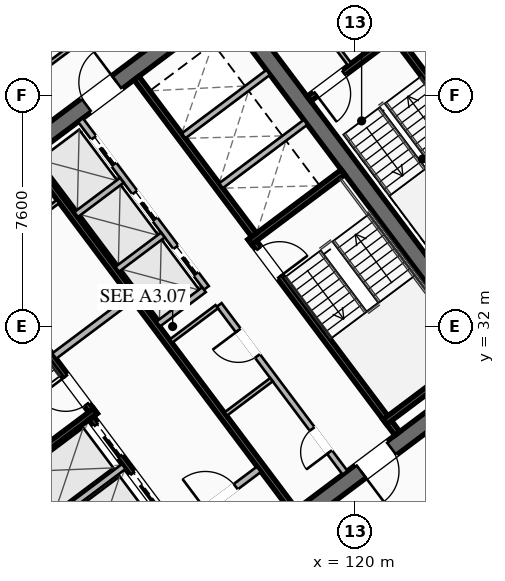
"""IFC4 building model, lengths in metres.
Left out: names, types, materials, properties, quantities, classifications, styles, units other than length and angle.
Written with IfcOpenShell. Run it as: python <this file> out.ifc"""

import sys

from ifc_helpers import new_model, si_unit, direction, frame, frame_2d, origin, place, context, subcontext, project, spatial, rectangle, extrude, element, fill, save


model = new_model("IFC4")
c1 = context("Model", 3, precision=1e-05, world=origin(), true_north=direction((0.0, 1.0)))
c2 = subcontext(c1, "Body", "Model", "MODEL_VIEW")
j1 = project(units=[si_unit("LENGTHUNIT", "METRE"), si_unit("PLANEANGLEUNIT", "RADIAN")], contexts=[c1])
p1 = place(None, origin())
s1 = spatial("IfcSite", under=j1, at=p1, CompositionType="ELEMENT")
p2 = place(p1, origin())
s2 = spatial("IfcBuilding", under=s1, at=p2, CompositionType="ELEMENT")
p3 = place(p2, frame((0.0, 0.0, 121.5)))
s3 = spatial("IfcBuildingStorey", under=s2, at=p3, CompositionType="ELEMENT", Elevation=121.5)
for number, where, z_axis, x_axis in (
    (1, (112.436, 21.077, 0.0), (0.0, 0.0, 1.0), (-0.6, 0.8, 0.0)),
    (2, (115.564, 42.923, 0.0), (0.0, 0.0, 1.0), (0.6, -0.8, 0.0)),
):
    element("IfcWall", number, at=place(p3, frame(where, z_axis=z_axis, x_axis=x_axis)), inside=s3, PredefinedType="SHEAR", context=c2, shape_type="SweptSolid", body=[
        extrude(rectangle(XDim=15.6, YDim=0.55, at=frame_2d((7.8, 0.0))), origin(), (0.0, 0.0, 1.0), 3.55),
    ])
p4 = place(p3, frame((124.539, 30.498, 0.0), z_axis=(0.0, 0.0, 1.0), x_axis=(-0.799998054672, -0.600002593761, 0.0)))
e3 = element("IfcWall", 3, at=p4, inside=s3, PredefinedType="SHEAR", context=c2, shape_type="SweptSolid", body=[
    extrude(rectangle(XDim=15.06, YDim=0.55, at=frame_2d((7.53, 0.0))), origin(), (0.0, 0.0, 1.0), 3.55),
])
p5 = place(p4, frame((9.23, 0.0, 0.0)))
e4 = element("IfcOpeningElement", 4, at=p5, cuts=e3, PredefinedType="OPENING", context=c2, shape_type="SweptSolid", body=[
    extrude(rectangle(XDim=1.25, YDim=2.25, at=frame_2d((0.625, 1.125))), frame((0.0, 0.285, 0.0), z_axis=(0.0, -1.0, 0.0), x_axis=(1.0, 0.0, 0.0)), (0.0, 0.0, 1.0), 0.57),
])
p6 = place(p4, frame((4.18, 0.0, 0.0)))
e5 = element("IfcOpeningElement", 5, at=p6, cuts=e3, PredefinedType="OPENING", context=c2, shape_type="SweptSolid", body=[
    extrude(rectangle(XDim=1.25, YDim=2.25, at=frame_2d((0.625, 1.125))), frame((0.0, 0.285, 0.0), z_axis=(0.0, -1.0, 0.0), x_axis=(1.0, 0.0, 0.0)), (0.0, 0.0, 1.0), 0.57),
])
p7 = place(p3, frame((103.461, 33.502, 0.0), z_axis=(0.0, 0.0, 1.0), x_axis=(0.799998054672, 0.600002593761, 0.0)))
e6 = element("IfcWall", 6, at=p7, inside=s3, PredefinedType="SHEAR", context=c2, shape_type="SweptSolid", body=[
    extrude(rectangle(XDim=15.06, YDim=0.55, at=frame_2d((7.53, 0.0))), origin(), (0.0, 0.0, 1.0), 3.55),
])
p8 = place(p7, frame((4.58, 0.0, 0.0)))
e7 = element("IfcOpeningElement", 7, at=p8, cuts=e6, PredefinedType="OPENING", context=c2, shape_type="SweptSolid", body=[
    extrude(rectangle(XDim=1.25, YDim=2.25, at=frame_2d((0.625, 1.125))), frame((0.0, 0.285, 0.0), z_axis=(0.0, -1.0, 0.0), x_axis=(1.0, 0.0, 0.0)), (0.0, 0.0, 1.0), 0.57),
])
p9 = place(p7, frame((9.63, 0.0, 0.0)))
e8 = element("IfcOpeningElement", 8, at=p9, cuts=e6, PredefinedType="OPENING", context=c2, shape_type="SweptSolid", body=[
    extrude(rectangle(XDim=1.25, YDim=2.25, at=frame_2d((0.625, 1.125))), frame((0.0, 0.285, 0.0), z_axis=(0.0, -1.0, 0.0), x_axis=(1.0, 0.0, 0.0)), (0.0, 0.0, 1.0), 0.57),
])
p10 = place(p3, frame((111.44, 29.08, 0.0), z_axis=(0.0, 0.0, 1.0), x_axis=(-0.59999029481, 0.8000072788, 0.0)))
e9 = element("IfcWall", 9, at=p10, inside=s3, PredefinedType="SHEAR", context=c2, shape_type="SweptSolid", body=[
    extrude(rectangle(XDim=8.05, YDim=0.2, at=frame_2d((4.025, 0.0))), origin(), (0.0, 0.0, 1.0), 3.37),
])
p11 = place(p10, frame((0.45, 0.0, 0.0)))
e10 = element("IfcOpeningElement", 10, at=p11, cuts=e9, PredefinedType="OPENING", context=c2, shape_type="SweptSolid", body=[
    extrude(rectangle(XDim=1.15, YDim=2.2, at=frame_2d((0.575, 1.1))), frame((0.0, 0.11, 0.0), z_axis=(0.0, -1.0, 0.0), x_axis=(1.0, 0.0, 0.0)), (0.0, 0.0, 1.0), 0.22),
])
p12 = place(p3, frame((108.396, 26.922, 0.0), z_axis=(0.0, 0.0, 1.0), x_axis=(0.800015298837, 0.599979601008, 0.0)))
e11 = element("IfcWall", 11, at=p12, inside=s3, PredefinedType="SHEAR", context=c2, shape_type="SweptSolid", body=[
    extrude(rectangle(XDim=3.83, YDim=0.2, at=frame_2d((1.915, 0.0))), origin(), (0.0, 0.0, 1.0), 3.37),
])
p13 = place(p3, frame((116.56, 34.92, 0.0), z_axis=(0.0, 0.0, 1.0), x_axis=(0.59999029481, -0.8000072788, 0.0)))
e12 = element("IfcWall", 12, at=p13, inside=s3, PredefinedType="SHEAR", context=c2, shape_type="SweptSolid", body=[
    extrude(rectangle(XDim=8.05, YDim=0.2, at=frame_2d((4.025, 0.0))), origin(), (0.0, 0.0, 1.0), 3.37),
])
p14 = place(p13, frame((0.45, 0.0, 0.0)))
e13 = element("IfcOpeningElement", 13, at=p14, cuts=e12, PredefinedType="OPENING", context=c2, shape_type="SweptSolid", body=[
    extrude(rectangle(XDim=1.15, YDim=2.2, at=frame_2d((0.575, 1.1))), frame((0.0, 0.11, 0.0), z_axis=(0.0, -1.0, 0.0), x_axis=(1.0, 0.0, 0.0)), (0.0, 0.0, 1.0), 0.22),
])
for number, where, z_axis, x_axis in (
    (14, (116.54, 34.78, 0.0), (0.0, 0.0, 1.0), (0.8, 0.6, 0.0)),
    (15, (120.98, 28.86, 0.0), (0.0, 0.0, 1.0), (0.8, 0.6, 0.0)),
):
    element("IfcWall", number, at=place(p3, frame(where, z_axis=z_axis, x_axis=x_axis)), inside=s3, PredefinedType="SHEAR", context=c2, shape_type="SweptSolid", body=[
        extrude(rectangle(XDim=3.83, YDim=0.2, at=frame_2d((1.915, 0.0))), origin(), (0.0, 0.0, 1.0), 3.37),
    ])
p15 = place(p3, frame((117.998, 25.936, 0.0), z_axis=(0.0, 0.0, 1.0), x_axis=(-0.600002693989, 0.799997979501, 0.0)))
e16 = element("IfcWall", 16, at=p15, inside=s3, PredefinedType="SHEAR", context=c2, shape_type="SweptSolid", body=[
    extrude(rectangle(XDim=14.5, YDim=0.2, at=frame_2d((7.25, 0.0))), origin(), (0.0, 0.0, 1.0), 3.37),
])
p16 = place(p3, frame((110.104, 31.028, 0.0), z_axis=(0.0, 0.0, 1.0), x_axis=(0.800018601094, 0.59997519774, 0.0)))
e17 = element("IfcWall", 17, at=p16, inside=s3, PredefinedType="SOLIDWALL", context=c2, shape_type="SweptSolid", body=[
    extrude(rectangle(XDim=3.15, YDim=0.22, at=frame_2d((1.575, 0.0))), origin(), (0.0, 0.0, 1.0), 2.723),
])
p17 = place(p3, frame((114.316, 25.412, 0.0), z_axis=(0.0, 0.0, 1.0), x_axis=(0.800018601094, 0.59997519774, 0.0)))
e18 = element("IfcWall", 18, at=p17, inside=s3, PredefinedType="SOLIDWALL", context=c2, shape_type="SweptSolid", body=[
    extrude(rectangle(XDim=3.15, YDim=0.22, at=frame_2d((1.575, 0.0))), origin(), (0.0, 0.0, 1.0), 2.723),
])
p18 = place(p17, frame((0.95, 0.0, 0.0)))
e19 = element("IfcOpeningElement", 19, at=p18, cuts=e18, PredefinedType="OPENING", context=c2, shape_type="SweptSolid", body=[
    extrude(rectangle(XDim=1.25, YDim=2.25, at=frame_2d((0.625, 1.125))), frame((0.0, 0.12, 0.0), z_axis=(0.0, -1.0, 0.0), x_axis=(1.0, 0.0, 0.0)), (0.0, 0.0, 1.0), 0.24),
])
p19 = place(p3, frame((115.19, 23.83, 0.0), z_axis=(0.0, 0.0, 1.0), x_axis=(-0.599993943644, 0.800004542231, 0.0)))
e20 = element("IfcWall", 20, at=p19, inside=s3, PredefinedType="SHEAR", context=c2, shape_type="SweptSolid", body=[
    extrude(rectangle(XDim=6.45, YDim=0.2, at=frame_2d((3.225, 0.0))), origin(), (0.0, 0.0, 1.0), 3.37),
])
p20 = place(p19, frame((4.875, 0.0, 0.0)))
e21 = element("IfcOpeningElement", 21, at=p20, cuts=e20, PredefinedType="OPENING", context=c2, shape_type="SweptSolid", body=[
    extrude(rectangle(XDim=1.3, YDim=2.25, at=frame_2d((0.65, 1.125))), frame((0.0, 0.11, 0.0), z_axis=(0.0, -1.0, 0.0), x_axis=(1.0, 0.0, 0.0)), (0.0, 0.0, 1.0), 0.22),
])
p21 = place(p19, frame((2.875, 0.0, 0.0)))
e22 = element("IfcOpeningElement", 22, at=p21, cuts=e20, PredefinedType="OPENING", context=c2, shape_type="SweptSolid", body=[
    extrude(rectangle(XDim=1.3, YDim=2.25, at=frame_2d((0.65, 1.125))), frame((0.0, 0.11, 0.0), z_axis=(0.0, -1.0, 0.0), x_axis=(1.0, 0.0, 0.0)), (0.0, 0.0, 1.0), 0.22),
])
p22 = place(p19, frame((0.675, 0.0, 0.0)))
e23 = element("IfcOpeningElement", 23, at=p22, cuts=e20, PredefinedType="OPENING", context=c2, shape_type="SweptSolid", body=[
    extrude(rectangle(XDim=1.3, YDim=2.25, at=frame_2d((0.65, 1.125))), frame((0.0, 0.11, 0.0), z_axis=(0.0, -1.0, 0.0), x_axis=(1.0, 0.0, 0.0)), (0.0, 0.0, 1.0), 0.22),
])
p23 = place(p3, frame((109.608, 25.306, 0.0), z_axis=(0.0, 0.0, 1.0), x_axis=(0.8, 0.6, 0.0)))
e24 = element("IfcWall", 24, at=p23, inside=s3, PredefinedType="SOLIDWALL", context=c2, shape_type="SweptSolid", body=[
    extrude(rectangle(XDim=3.48, YDim=0.2, at=frame_2d((1.74, 0.0))), origin(), (0.0, 0.0, 1.0), 3.37),
])
p24 = place(p3, frame((112.81, 40.17, 0.0), z_axis=(0.0, 0.0, 1.0), x_axis=(0.599993943644, -0.800004542231, 0.0)))
e25 = element("IfcWall", 25, at=p24, inside=s3, PredefinedType="SHEAR", context=c2, shape_type="SweptSolid", body=[
    extrude(rectangle(XDim=6.45, YDim=0.2, at=frame_2d((3.225, 0.0))), origin(), (0.0, 0.0, 1.0), 3.37),
])
for number, where, z_axis, x_axis in (
    (26, (115.59, 36.63, 0.0), (0.0, 0.0, 1.0), (0.8, 0.6, 0.0)),
    (27, (114.36, 38.27, 0.0), (0.0, 0.0, 1.0), (0.8, 0.6, 0.0)),
):
    element("IfcWall", number, at=place(p3, frame(where, z_axis=z_axis, x_axis=x_axis)), inside=s3, PredefinedType="SOLIDWALL", context=c2, shape_type="SweptSolid", body=[
        extrude(rectangle(XDim=3.48, YDim=0.2, at=frame_2d((1.74, 0.0))), origin(), (0.0, 0.0, 1.0), 3.37),
    ])
p25 = place(p3, frame((107.71, 34.22, 0.0), z_axis=(0.0, 0.0, 1.0), x_axis=(0.799981399002, 0.60002480053, 0.0)))
e28 = element("IfcWall", 28, at=p25, inside=s3, PredefinedType="PARTITIONING", context=c2, shape_type="SweptSolid", body=[
    extrude(rectangle(XDim=3.15, YDim=0.135, at=frame_2d((1.575, 0.0))), origin(), (0.0, 0.0, 1.0), 2.723),
])
p26 = place(p25, frame((1.05, 0.0, 0.0)))
e29 = element("IfcOpeningElement", 29, at=p26, cuts=e28, PredefinedType="OPENING", context=c2, shape_type="SweptSolid", body=[
    extrude(rectangle(XDim=1.05, YDim=2.2, at=frame_2d((0.525, 1.1))), frame((0.0, 0.077, 0.0), z_axis=(0.0, -1.0, 0.0), x_axis=(1.0, 0.0, 0.0)), (0.0, 0.0, 1.0), 0.155),
])
p27 = place(p3, frame((119.67, 27.19, 0.0), z_axis=(0.0, 0.0, 1.0), x_axis=(-0.599988677396, 0.800008491828, 0.0)))
e30 = element("IfcWall", 30, at=p27, inside=s3, PredefinedType="SOLIDWALL", context=c2, shape_type="SweptSolid", body=[
    extrude(rectangle(XDim=6.9, YDim=0.2, at=frame_2d((3.45, 0.0))), origin(), (0.0, 0.0, 1.0), 2.723),
])
p28 = place(p27, frame((0.85, 0.0, 0.0)))
e31 = element("IfcOpeningElement", 31, at=p28, cuts=e30, PredefinedType="OPENING", context=c2, shape_type="SweptSolid", body=[
    extrude(rectangle(XDim=0.95, YDim=2.05, at=frame_2d((0.475, 1.025))), frame((0.0, 0.11, 0.0), z_axis=(0.0, -1.0, 0.0), x_axis=(1.0, 0.0, 0.0)), (0.0, 0.0, 1.0), 0.22),
])
p29 = place(p27, frame((4.8, 0.0, 0.0)))
e32 = element("IfcOpeningElement", 32, at=p29, cuts=e30, PredefinedType="OPENING", context=c2, shape_type="SweptSolid", body=[
    extrude(rectangle(XDim=1.05, YDim=2.2, at=frame_2d((0.525, 1.1))), frame((0.0, 0.11, 0.0), z_axis=(0.0, -1.0, 0.0), x_axis=(1.0, 0.0, 0.0)), (0.0, 0.0, 1.0), 0.22),
])
for number, where, z_axis, x_axis in (
    (33, (113.946, 31.522, 0.0), (0.0, 0.0, 1.0), (0.8, 0.6, 0.0)),
    (34, (115.746, 29.122, 0.0), (0.0, 0.0, 1.0), (0.8, 0.6, 0.0)),
):
    element("IfcWall", number, at=place(p3, frame(where, z_axis=z_axis, x_axis=x_axis)), inside=s3, PredefinedType="PARTITIONING", context=c2, shape_type="SweptSolid", body=[
        extrude(rectangle(XDim=1.88, YDim=0.135, at=frame_2d((0.94, 0.0))), origin(), (0.0, 0.0, 1.0), 2.723),
    ])
p30 = place(p3, frame((115.11, 33.27, 0.0), z_axis=(0.0, 0.0, 1.0), x_axis=(-0.600011322243, 0.799991508192, 0.0)))
e35 = element("IfcWall", 35, at=p30, inside=s3, PredefinedType="SOLIDWALL", context=c2, shape_type="SweptSolid", body=[
    extrude(rectangle(XDim=6.9, YDim=0.2, at=frame_2d((3.45, 0.0))), origin(), (0.0, 0.0, 1.0), 3.37),
])
p31 = place(p30, frame((0.575, 0.0, 0.0)))
e36 = element("IfcOpeningElement", 36, at=p31, cuts=e35, PredefinedType="OPENING", context=c2, shape_type="SweptSolid", body=[
    extrude(rectangle(XDim=1.1, YDim=2.2, at=frame_2d((0.55, 1.1))), frame((0.0, 0.11, 0.0), z_axis=(0.0, -1.0, 0.0), x_axis=(1.0, 0.0, 0.0)), (0.0, 0.0, 1.0), 0.22),
])
p32 = place(p30, frame((2.825, 0.0, 0.0)))
e37 = element("IfcOpeningElement", 37, at=p32, cuts=e35, PredefinedType="OPENING", context=c2, shape_type="SweptSolid", body=[
    extrude(rectangle(XDim=1.1, YDim=2.2, at=frame_2d((0.55, 1.1))), frame((0.0, 0.11, 0.0), z_axis=(0.0, -1.0, 0.0), x_axis=(1.0, 0.0, 0.0)), (0.0, 0.0, 1.0), 0.22),
])
p33 = place(p30, frame((5.075, 0.0, 0.0)))
e38 = element("IfcOpeningElement", 38, at=p33, cuts=e35, PredefinedType="OPENING", context=c2, shape_type="SweptSolid", body=[
    extrude(rectangle(XDim=1.1, YDim=2.2, at=frame_2d((0.55, 1.1))), frame((0.0, 0.11, 0.0), z_axis=(0.0, -1.0, 0.0), x_axis=(1.0, 0.0, 0.0)), (0.0, 0.0, 1.0), 0.22),
])
p34 = place(p3, frame((113.526, 32.082, 0.0), z_axis=(0.0, 0.0, 1.0), x_axis=(0.800046745961, 0.599937666993, 0.0)))
e39 = element("IfcWall", 39, at=p34, inside=s3, PredefinedType="SOLIDWALL", context=c2, shape_type="SweptSolid", body=[
    extrude(rectangle(XDim=1.88, YDim=0.2, at=frame_2d((0.94, 0.0))), origin(), (0.0, 0.0, 1.0), 3.37),
])
p35 = place(p3, frame((112.176, 33.882, 0.0), z_axis=(0.0, 0.0, 1.0), x_axis=(0.8, 0.6, 0.0)))
e40 = element("IfcWall", 40, at=p35, inside=s3, PredefinedType="SOLIDWALL", context=c2, shape_type="SweptSolid", body=[
    extrude(rectangle(XDim=1.88, YDim=0.2, at=frame_2d((0.94, 0.0))), origin(), (0.0, 0.0, 1.0), 3.37),
])
p36 = place(p3, frame((110.826, 35.682, 0.0), z_axis=(0.0, 0.0, 1.0), x_axis=(0.799984418148, 0.600020775241, 0.0)))
e41 = element("IfcWall", 41, at=p36, inside=s3, PredefinedType="SOLIDWALL", context=c2, shape_type="SweptSolid", body=[
    extrude(rectangle(XDim=1.88, YDim=0.2, at=frame_2d((0.94, 0.0))), origin(), (0.0, 0.0, 1.0), 3.37),
])
p37 = place(p3, frame((125.304, 36.228, 0.0), z_axis=(0.0, 0.0, 1.0), x_axis=(-0.59998851072, 0.800008616831, 0.0)))
e42 = element("IfcWall", 42, at=p37, inside=s3, PredefinedType="SHEAR", context=c2, shape_type="SweptSolid", body=[
    extrude(rectangle(XDim=6.8, YDim=0.2, at=frame_2d((3.4, 0.0))), origin(), (0.0, 0.0, 1.0), 3.37),
])
p38 = place(p3, frame((121.204, 41.528, 0.0), z_axis=(0.0, 0.0, 1.0), x_axis=(-0.800017232136, -0.599977023131, 0.0)))
e43 = element("IfcWall", 43, at=p38, inside=s3, PredefinedType="SHEAR", context=c2, shape_type="SweptSolid", body=[
    extrude(rectangle(XDim=3.4, YDim=0.2, at=frame_2d((1.7, 0.0))), origin(), (0.0, 0.0, 1.0), 3.37),
])
p39 = place(p38, frame((1.975, 0.0, 0.0)))
e44 = element("IfcOpeningElement", 44, at=p39, cuts=e43, PredefinedType="OPENING", context=c2, shape_type="SweptSolid", body=[
    extrude(rectangle(XDim=1.15, YDim=2.2, at=frame_2d((0.575, 1.1))), frame((0.0, 0.11, 0.0), z_axis=(0.0, -1.0, 0.0), x_axis=(1.0, 0.0, 0.0)), (0.0, 0.0, 1.0), 0.22),
])
p40 = place(p3, frame((119.824, 40.618, 0.0), z_axis=(0.0, 0.0, 1.0), x_axis=(-0.599982243973, 0.800013316712, 0.0)))
e45 = element("IfcWall", 45, at=p40, inside=s3, PredefinedType="PARTITIONING", context=c2, shape_type="SweptSolid", body=[
    extrude(rectangle(XDim=4.4, YDim=0.135, at=frame_2d((2.2, 0.0))), origin(), (0.0, 0.0, 1.0), 2.723),
])
p41 = place(p3, frame((95.87, 30.09, 0.0), z_axis=(0.0, 0.0, 1.0), x_axis=(0.799997191971, 0.600003744021, 0.0)))
e46 = element("IfcWall", 46, at=p41, inside=s3, PredefinedType="PARTITIONING", context=c2, shape_type="SweptSolid", body=[
    extrude(rectangle(XDim=31.3, YDim=0.135, at=frame_2d((15.65, 0.0))), origin(), (0.0, 0.0, 1.0), 2.723),
])
p42 = place(p41, frame((0.3, 0.0, 0.0)))
e47 = element("IfcOpeningElement", 47, at=p42, cuts=e46, PredefinedType="OPENING", context=c2, shape_type="SweptSolid", body=[
    extrude(rectangle(XDim=0.95, YDim=2.05, at=frame_2d((0.475, 1.025))), frame((0.0, 0.077, 0.0), z_axis=(0.0, -1.0, 0.0), x_axis=(1.0, 0.0, 0.0)), (0.0, 0.0, 1.0), 0.155),
])
p43 = place(p41, frame((30.05, 0.0, 0.0)))
e48 = element("IfcOpeningElement", 48, at=p43, cuts=e46, PredefinedType="OPENING", context=c2, shape_type="SweptSolid", body=[
    extrude(rectangle(XDim=0.95, YDim=2.05, at=frame_2d((0.475, 1.025))), frame((0.0, 0.077, 0.0), z_axis=(0.0, -1.0, 0.0), x_axis=(1.0, 0.0, 0.0)), (0.0, 0.0, 1.0), 0.155),
])
p44 = place(p3, frame((133.282, 32.374, 0.0), z_axis=(0.0, 0.0, 1.0), x_axis=(-0.8, -0.6, 0.0)))
e49 = element("IfcWall", 49, at=p44, inside=s3, PredefinedType="PARTITIONING", context=c2, shape_type="SweptSolid", body=[
    extrude(rectangle(XDim=31.3, YDim=0.135, at=frame_2d((15.65, 0.0))), origin(), (0.0, 0.0, 1.0), 2.723),
])
p45 = place(p44, frame((29.97, 0.0, 0.0)))
e50 = element("IfcOpeningElement", 50, at=p45, cuts=e49, PredefinedType="OPENING", context=c2, shape_type="SweptSolid", body=[
    extrude(rectangle(XDim=0.95, YDim=2.05, at=frame_2d((0.475, 1.025))), frame((0.0, 0.077, 0.0), z_axis=(0.0, -1.0, 0.0), x_axis=(1.0, 0.0, 0.0)), (0.0, 0.0, 1.0), 0.155),
])
p46 = place(p44, frame((19.151, 0.0, 0.0)))
e51 = element("IfcOpeningElement", 51, at=p46, cuts=e49, PredefinedType="OPENING", context=c2, shape_type="SweptSolid", body=[
    extrude(rectangle(XDim=0.95, YDim=2.05, at=frame_2d((0.475, 1.025))), frame((0.0, 0.077, 0.0), z_axis=(0.0, -1.0, 0.0), x_axis=(1.0, 0.0, 0.0)), (0.0, 0.0, 1.0), 0.155),
])
p47 = place(p44, frame((14.901, 0.0, 0.0)))
e52 = element("IfcOpeningElement", 52, at=p47, cuts=e49, PredefinedType="OPENING", context=c2, shape_type="SweptSolid", body=[
    extrude(rectangle(XDim=0.95, YDim=2.05, at=frame_2d((0.475, 1.025))), frame((0.0, 0.077, 0.0), z_axis=(0.0, -1.0, 0.0), x_axis=(1.0, 0.0, 0.0)), (0.0, 0.0, 1.0), 0.155),
])
p48 = place(p44, frame((10.92, 0.0, 0.0)))
e53 = element("IfcOpeningElement", 53, at=p48, cuts=e49, PredefinedType="OPENING", context=c2, shape_type="SweptSolid", body=[
    extrude(rectangle(XDim=0.95, YDim=2.05, at=frame_2d((0.475, 1.025))), frame((0.0, 0.077, 0.0), z_axis=(0.0, -1.0, 0.0), x_axis=(1.0, 0.0, 0.0)), (0.0, 0.0, 1.0), 0.155),
])
p49 = place(p44, frame((0.38, 0.0, 0.0)))
e54 = element("IfcOpeningElement", 54, at=p49, cuts=e49, PredefinedType="OPENING", context=c2, shape_type="SweptSolid", body=[
    extrude(rectangle(XDim=0.95, YDim=2.05, at=frame_2d((0.475, 1.025))), frame((0.0, 0.077, 0.0), z_axis=(0.0, -1.0, 0.0), x_axis=(1.0, 0.0, 0.0)), (0.0, 0.0, 1.0), 0.155),
])
p50 = place(p3, frame((112.104, 20.928, 0.0), z_axis=(0.0, 0.0, 1.0), x_axis=(-0.599994940075, 0.800003794918, 0.0)))
e55 = element("IfcWall", 55, at=p50, inside=s3, PredefinedType="PARTITIONING", context=c2, shape_type="SweptSolid", body=[
    extrude(rectangle(XDim=15.44, YDim=0.135, at=frame_2d((7.72, 0.0))), origin(), (0.0, 0.0, 1.0), 2.723),
])
p51 = place(p9, origin())
e56 = element("IfcDoor", 56, at=p51, inside=s3, OperationType="SINGLE_SWING_RIGHT", PredefinedType="DOOR", context=c2, shape_type="SweptSolid", body=[
    extrude(rectangle(XDim=1.25, YDim=2.25, at=frame_2d((0.625, 1.125))), frame((0.0, 0.025, 0.0), z_axis=(0.0, -1.0, 0.0), x_axis=(1.0, 0.0, 0.0)), (0.0, 0.0, 1.0), 0.05),
])
fill(e8, e56)
p52 = place(p6, origin())
e57 = element("IfcDoor", 57, at=p52, inside=s3, OperationType="SINGLE_SWING_RIGHT", PredefinedType="DOOR", context=c2, shape_type="SweptSolid", body=[
    extrude(rectangle(XDim=1.25, YDim=2.25, at=frame_2d((0.625, 1.125))), frame((0.0, 0.025, 0.0), z_axis=(0.0, -1.0, 0.0), x_axis=(1.0, 0.0, 0.0)), (0.0, 0.0, 1.0), 0.05),
])
fill(e5, e57)
p53 = place(p11, origin())
e58 = element("IfcDoor", 58, at=p53, inside=s3, OperationType="SINGLE_SWING_RIGHT", PredefinedType="DOOR", context=c2, shape_type="SweptSolid", body=[
    extrude(rectangle(XDim=1.15, YDim=2.2, at=frame_2d((0.575, 1.1))), frame((0.0, 0.025, 0.0), z_axis=(0.0, -1.0, 0.0), x_axis=(1.0, 0.0, 0.0)), (0.0, 0.0, 1.0), 0.05),
])
fill(e10, e58)
p54 = place(p14, origin())
e59 = element("IfcDoor", 59, at=p54, inside=s3, OperationType="SINGLE_SWING_RIGHT", PredefinedType="DOOR", context=c2, shape_type="SweptSolid", body=[
    extrude(rectangle(XDim=1.15, YDim=2.2, at=frame_2d((0.575, 1.1))), frame((0.0, 0.025, 0.0), z_axis=(0.0, -1.0, 0.0), x_axis=(1.0, 0.0, 0.0)), (0.0, 0.0, 1.0), 0.05),
])
fill(e13, e59)
p55 = place(p18, origin())
e60 = element("IfcDoor", 60, at=p55, inside=s3, OperationType="SINGLE_SWING_LEFT", PredefinedType="DOOR", context=c2, shape_type="SweptSolid", body=[
    extrude(rectangle(XDim=1.25, YDim=2.25, at=frame_2d((0.625, 1.125))), frame((0.0, 0.025, 0.0), z_axis=(0.0, -1.0, 0.0), x_axis=(1.0, 0.0, 0.0)), (0.0, 0.0, 1.0), 0.05),
])
fill(e19, e60)
p56 = place(p28, origin())
e61 = element("IfcDoor", 61, at=p56, inside=s3, OperationType="SINGLE_SWING_LEFT", PredefinedType="DOOR", context=c2, shape_type="SweptSolid", body=[
    extrude(rectangle(XDim=0.95, YDim=2.05, at=frame_2d((0.475, 1.025))), frame((0.0, 0.025, 0.0), z_axis=(0.0, -1.0, 0.0), x_axis=(1.0, 0.0, 0.0)), (0.0, 0.0, 1.0), 0.05),
])
fill(e31, e61)
p57 = place(p29, origin())
e62 = element("IfcDoor", 62, at=p57, inside=s3, OperationType="SINGLE_SWING_RIGHT", PredefinedType="DOOR", context=c2, shape_type="SweptSolid", body=[
    extrude(rectangle(XDim=1.05, YDim=2.2, at=frame_2d((0.525, 1.1))), frame((0.0, 0.025, 0.0), z_axis=(0.0, -1.0, 0.0), x_axis=(1.0, 0.0, 0.0)), (0.0, 0.0, 1.0), 0.05),
])
fill(e32, e62)
p58 = place(p39, origin())
e63 = element("IfcDoor", 63, at=p58, inside=s3, OperationType="SINGLE_SWING_RIGHT", PredefinedType="DOOR", context=c2, shape_type="SweptSolid", body=[
    extrude(rectangle(XDim=1.15, YDim=2.2, at=frame_2d((0.575, 1.1))), frame((0.0, 0.025, 0.0), z_axis=(0.0, -1.0, 0.0), x_axis=(1.0, 0.0, 0.0)), (0.0, 0.0, 1.0), 0.05),
])
fill(e44, e63)
p59 = place(p20, origin())
e64 = element("IfcDoor", 64, at=p59, inside=s3, OperationType="SLIDING_TO_LEFT", PredefinedType="DOOR", context=c2, shape_type="SweptSolid", body=[
    extrude(rectangle(XDim=1.3, YDim=2.25, at=frame_2d((0.65, 1.125))), frame((0.0, 0.025, 0.0), z_axis=(0.0, -1.0, 0.0), x_axis=(1.0, 0.0, 0.0)), (0.0, 0.0, 1.0), 0.05),
])
fill(e21, e64)
p60 = place(p21, origin())
e65 = element("IfcDoor", 65, at=p60, inside=s3, OperationType="SLIDING_TO_LEFT", PredefinedType="DOOR", context=c2, shape_type="SweptSolid", body=[
    extrude(rectangle(XDim=1.3, YDim=2.25, at=frame_2d((0.65, 1.125))), frame((0.0, 0.025, 0.0), z_axis=(0.0, -1.0, 0.0), x_axis=(1.0, 0.0, 0.0)), (0.0, 0.0, 1.0), 0.05),
])
fill(e22, e65)
p61 = place(p31, origin())
e66 = element("IfcDoor", 66, at=p61, inside=s3, OperationType="SLIDING_TO_LEFT", PredefinedType="DOOR", context=c2, shape_type="SweptSolid", body=[
    extrude(rectangle(XDim=1.1, YDim=2.2, at=frame_2d((0.55, 1.1))), frame((0.0, 0.025, 0.0), z_axis=(0.0, -1.0, 0.0), x_axis=(1.0, 0.0, 0.0)), (0.0, 0.0, 1.0), 0.05),
])
fill(e36, e66)
p62 = place(p32, origin())
e67 = element("IfcDoor", 67, at=p62, inside=s3, OperationType="SLIDING_TO_LEFT", PredefinedType="DOOR", context=c2, shape_type="SweptSolid", body=[
    extrude(rectangle(XDim=1.1, YDim=2.2, at=frame_2d((0.55, 1.1))), frame((0.0, 0.025, 0.0), z_axis=(0.0, -1.0, 0.0), x_axis=(1.0, 0.0, 0.0)), (0.0, 0.0, 1.0), 0.05),
])
fill(e37, e67)
p63 = place(p33, origin())
e68 = element("IfcDoor", 68, at=p63, inside=s3, OperationType="SLIDING_TO_LEFT", PredefinedType="DOOR", context=c2, shape_type="SweptSolid", body=[
    extrude(rectangle(XDim=1.1, YDim=2.2, at=frame_2d((0.55, 1.1))), frame((0.0, 0.025, 0.0), z_axis=(0.0, -1.0, 0.0), x_axis=(1.0, 0.0, 0.0)), (0.0, 0.0, 1.0), 0.05),
])
fill(e38, e68)
save(model, sys.argv[1])
